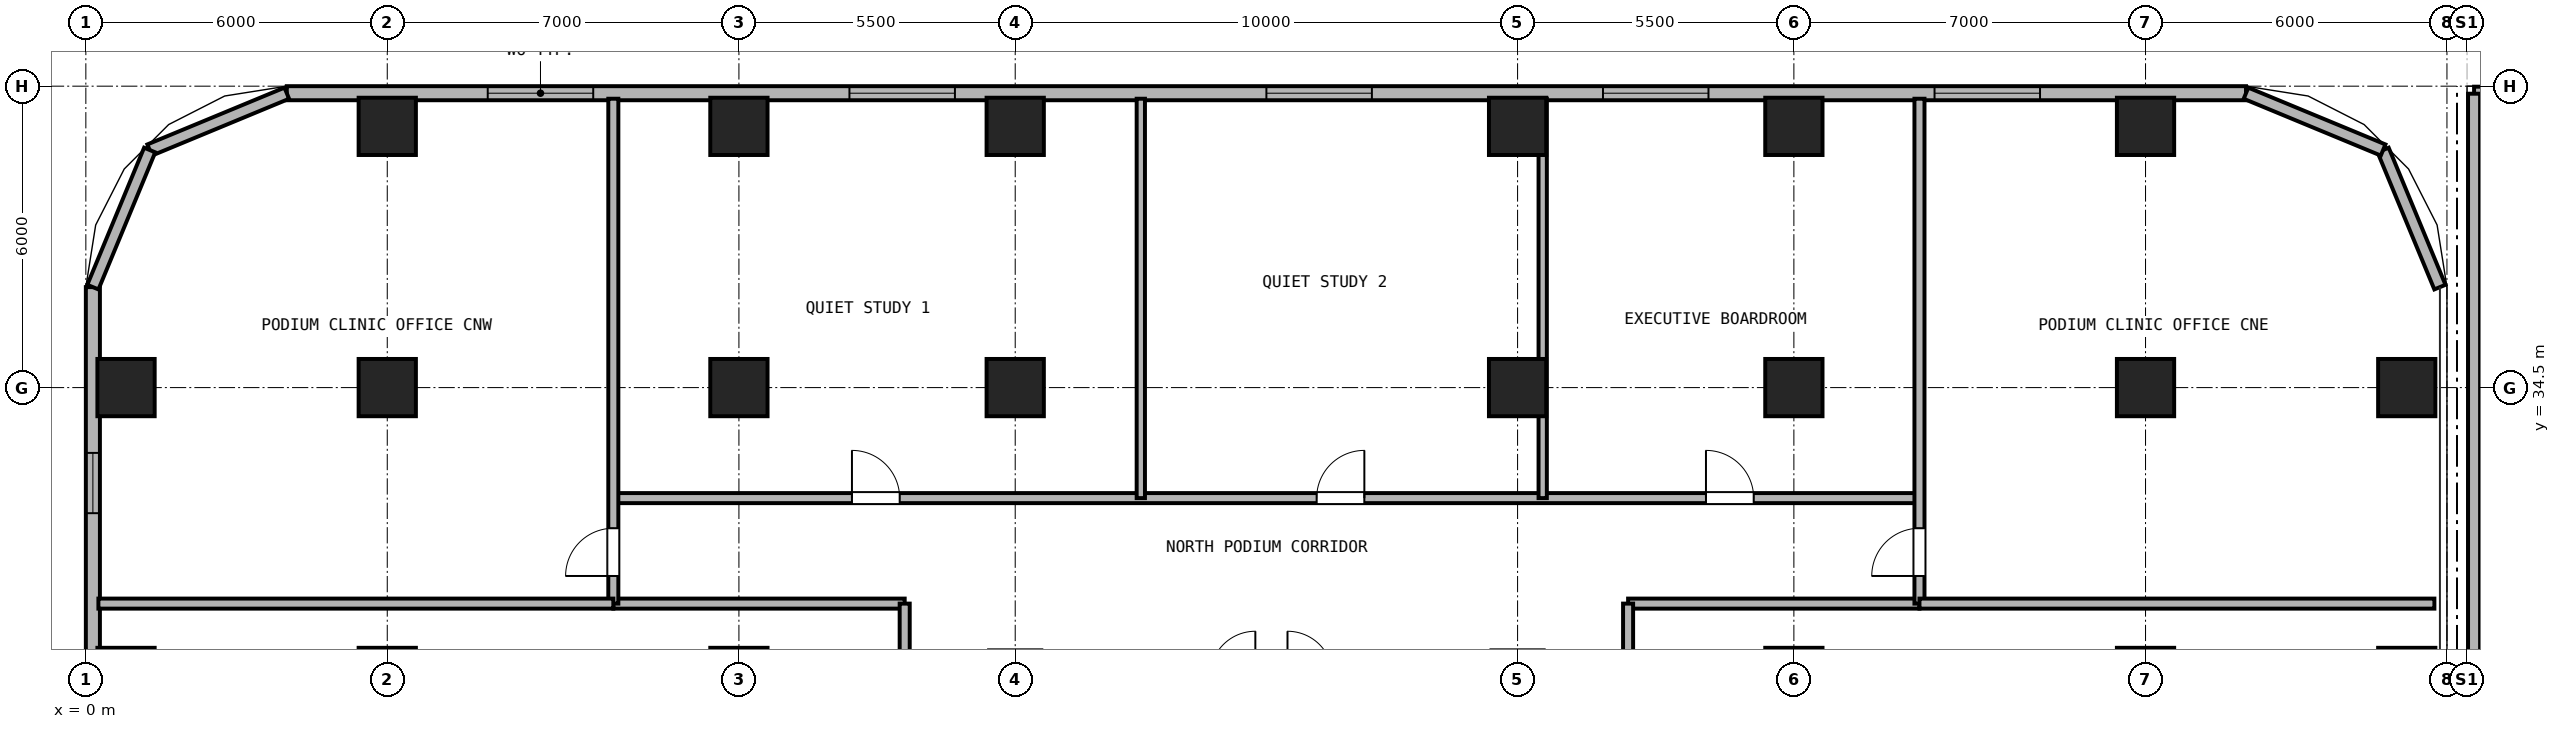
"""IFC4 building model, lengths in metres.
Left out: names, types, materials, properties, quantities, classifications, styles, units other than length and angle.
Written with IfcOpenShell. Run it as: python <this file> out.ifc"""

import sys

from ifc_helpers import new_model, si_unit, direction, frame, frame_2d, origin, origin_2d, place, context, subcontext, project, spatial, rectangle, hollow_rectangle, extrude, source, transform, mapped, element, fill, save


model = new_model("IFC4")
c1 = context("Model", 3, precision=1e-05, world=origin(), true_north=direction((0.0, 1.0)))
c2 = subcontext(c1, "Body", "Model", "MODEL_VIEW")
j1 = project(units=[si_unit("LENGTHUNIT", "METRE"), si_unit("PLANEANGLEUNIT", "RADIAN")], contexts=[c1])
p1 = place(None, origin())
s1 = spatial("IfcSite", under=j1, at=p1, CompositionType="ELEMENT")
p2 = place(p1, origin())
s2 = spatial("IfcBuilding", under=s1, at=p2, CompositionType="ELEMENT")
p3 = place(p2, frame((0.0, 0.0, 18.0)))
s3 = spatial("IfcBuildingStorey", under=s2, at=p3, CompositionType="ELEMENT", Elevation=18.0)
m1 = source(origin(), c2, "Body", "SweptSolid", [
    extrude(hollow_rectangle(XDim=1.14, YDim=1.14, WallThickness=0.07, at=origin_2d()), origin(), (0.0, 0.0, 1.0), 4.14),
])
for number, where, z_axis, x_axis in (
    (1, (6.0, 39.7, 0.0), (0.0, 0.0, 1.0), (1.0, 0.0, 0.0)),
    (2, (13.0, 39.7, 0.0), (0.0, 0.0, 1.0), (1.0, 0.0, 0.0)),
    (3, (18.5, 39.7, 0.0), (0.0, 0.0, 1.0), (1.0, 0.0, 0.0)),
    (4, (28.5, 39.7, 0.0), (0.0, 0.0, 1.0), (1.0, 0.0, 0.0)),
    (5, (34.0, 39.7, 0.0), (0.0, 0.0, 1.0), (1.0, 0.0, 0.0)),
    (6, (41.0, 39.7, 0.0), (0.0, 0.0, 1.0), (1.0, 0.0, 0.0)),
    (7, (0.8, 28.75, 0.0), (0.0, 0.0, 1.0), (1.0, 0.0, 0.0)),
    (8, (46.2, 28.75, 0.0), (0.0, 0.0, 1.0), (1.0, 0.0, 0.0)),
    (9, (0.8, 34.5, 0.0), (0.0, 0.0, 1.0), (1.0, 0.0, 0.0)),
    (10, (46.2, 34.5, 0.0), (0.0, 0.0, 1.0), (1.0, 0.0, 0.0)),
    (11, (6.0, 28.75, 0.0), (0.0, 0.0, 1.0), (1.0, 0.0, 0.0)),
    (12, (6.0, 34.5, 0.0), (0.0, 0.0, 1.0), (1.0, 0.0, 0.0)),
    (13, (13.0, 28.75, 0.0), (0.0, 0.0, 1.0), (1.0, 0.0, 0.0)),
    (14, (13.0, 34.5, 0.0), (0.0, 0.0, 1.0), (1.0, 0.0, 0.0)),
    (15, (18.5, 34.5, 0.0), (0.0, 0.0, 1.0), (1.0, 0.0, 0.0)),
    (16, (28.5, 34.5, 0.0), (0.0, 0.0, 1.0), (1.0, 0.0, 0.0)),
    (17, (34.0, 28.75, 0.0), (0.0, 0.0, 1.0), (1.0, 0.0, 0.0)),
    (18, (34.0, 34.5, 0.0), (0.0, 0.0, 1.0), (1.0, 0.0, 0.0)),
    (19, (41.0, 28.75, 0.0), (0.0, 0.0, 1.0), (1.0, 0.0, 0.0)),
    (20, (41.0, 34.5, 0.0), (0.0, 0.0, 1.0), (1.0, 0.0, 0.0)),
):
    element("IfcColumn", number, at=place(p3, frame(where, z_axis=z_axis, x_axis=x_axis)), inside=s3, PredefinedType="COLUMN", context=c2, shape_type="MappedRepresentation", body=[
        mapped(m1, transform((0.0, 0.0, 0.0), x_axis=(1.0, 0.0, 0.0), y_axis=(0.0, 1.0, 0.0), z_axis=(0.0, 0.0, 1.0), scale=1.0)),
    ])
p4 = place(p3, frame((0.14, 4.0, 0.0), z_axis=(0.0, 0.0, 1.0), x_axis=(0.0, 1.0, 0.0)))
e21 = element("IfcWall", 21, at=p4, inside=s3, PredefinedType="SOLIDWALL", context=c2, shape_type="SweptSolid", body=[
    extrude(rectangle(XDim=32.5, YDim=0.28, at=frame_2d((16.25, 0.0))), origin(), (0.0, 0.0, 1.0), 4.14),
])
p5 = place(p4, frame((3.6, 0.0, 0.9)))
e22 = element("IfcOpeningElement", 22, at=p5, cuts=e21, PredefinedType="OPENING", context=c2, shape_type="SweptSolid", body=[
    extrude(rectangle(XDim=1.2, YDim=1.65, at=frame_2d((0.6, 0.825))), frame((0.0, 0.15, 0.0), z_axis=(0.0, -1.0, 0.0), x_axis=(1.0, 0.0, 0.0)), (0.0, 0.0, 1.0), 0.3),
])
p6 = place(p4, frame((9.8, 0.0, 0.9)))
e23 = element("IfcOpeningElement", 23, at=p6, cuts=e21, PredefinedType="OPENING", context=c2, shape_type="SweptSolid", body=[
    extrude(rectangle(XDim=1.2, YDim=1.65, at=frame_2d((0.6, 0.825))), frame((0.0, 0.15, 0.0), z_axis=(0.0, -1.0, 0.0), x_axis=(1.0, 0.0, 0.0)), (0.0, 0.0, 1.0), 0.3),
])
p7 = place(p4, frame((15.8, 0.0, 0.9)))
e24 = element("IfcOpeningElement", 24, at=p7, cuts=e21, PredefinedType="OPENING", context=c2, shape_type="SweptSolid", body=[
    extrude(rectangle(XDim=1.2, YDim=1.65, at=frame_2d((0.6, 0.825))), frame((0.0, 0.15, 0.0), z_axis=(0.0, -1.0, 0.0), x_axis=(1.0, 0.0, 0.0)), (0.0, 0.0, 1.0), 0.3),
])
p8 = place(p4, frame((22.4, 0.0, 0.9)))
e25 = element("IfcOpeningElement", 25, at=p8, cuts=e21, PredefinedType="OPENING", context=c2, shape_type="SweptSolid", body=[
    extrude(rectangle(XDim=1.2, YDim=1.65, at=frame_2d((0.6, 0.825))), frame((0.0, 0.15, 0.0), z_axis=(0.0, -1.0, 0.0), x_axis=(1.0, 0.0, 0.0)), (0.0, 0.0, 1.0), 0.3),
])
p9 = place(p4, frame((28.0, 0.0, 0.9)))
e26 = element("IfcOpeningElement", 26, at=p9, cuts=e21, PredefinedType="OPENING", context=c2, shape_type="SweptSolid", body=[
    extrude(rectangle(XDim=1.2, YDim=1.65, at=frame_2d((0.6, 0.825))), frame((0.0, 0.15, 0.0), z_axis=(0.0, -1.0, 0.0), x_axis=(1.0, 0.0, 0.0)), (0.0, 0.0, 1.0), 0.3),
])
p10 = place(p3, frame((4.0, 40.36, 0.0), z_axis=(0.0, 0.0, 1.0), x_axis=(1.0, 0.0, 0.0)))
e27 = element("IfcWall", 27, at=p10, inside=s3, PredefinedType="SOLIDWALL", context=c2, shape_type="SweptSolid", body=[
    extrude(rectangle(XDim=39.0, YDim=0.28, at=frame_2d((19.5, 0.0))), origin(), (0.0, 0.0, 1.0), 4.14),
])
p11 = place(p10, frame((4.0, 0.0, 0.9)))
e28 = element("IfcOpeningElement", 28, at=p11, cuts=e27, PredefinedType="OPENING", context=c2, shape_type="SweptSolid", body=[
    extrude(rectangle(XDim=2.1, YDim=1.5, at=frame_2d((1.05, 0.75))), frame((0.0, 0.15, 0.0), z_axis=(0.0, -1.0, 0.0), x_axis=(1.0, 0.0, 0.0)), (0.0, 0.0, 1.0), 0.3),
])
p12 = place(p10, frame((11.2, 0.0, 0.9)))
e29 = element("IfcOpeningElement", 29, at=p12, cuts=e27, PredefinedType="OPENING", context=c2, shape_type="SweptSolid", body=[
    extrude(rectangle(XDim=2.1, YDim=1.5, at=frame_2d((1.05, 0.75))), frame((0.0, 0.15, 0.0), z_axis=(0.0, -1.0, 0.0), x_axis=(1.0, 0.0, 0.0)), (0.0, 0.0, 1.0), 0.3),
])
p13 = place(p10, frame((19.5, 0.0, 0.9)))
e30 = element("IfcOpeningElement", 30, at=p13, cuts=e27, PredefinedType="OPENING", context=c2, shape_type="SweptSolid", body=[
    extrude(rectangle(XDim=2.1, YDim=1.5, at=frame_2d((1.05, 0.75))), frame((0.0, 0.15, 0.0), z_axis=(0.0, -1.0, 0.0), x_axis=(1.0, 0.0, 0.0)), (0.0, 0.0, 1.0), 0.3),
])
p14 = place(p10, frame((26.2, 0.0, 0.9)))
e31 = element("IfcOpeningElement", 31, at=p14, cuts=e27, PredefinedType="OPENING", context=c2, shape_type="SweptSolid", body=[
    extrude(rectangle(XDim=2.1, YDim=1.5, at=frame_2d((1.05, 0.75))), frame((0.0, 0.15, 0.0), z_axis=(0.0, -1.0, 0.0), x_axis=(1.0, 0.0, 0.0)), (0.0, 0.0, 1.0), 0.3),
])
p15 = place(p10, frame((32.8, 0.0, 0.9)))
e32 = element("IfcOpeningElement", 32, at=p15, cuts=e27, PredefinedType="OPENING", context=c2, shape_type="SweptSolid", body=[
    extrude(rectangle(XDim=2.1, YDim=1.5, at=frame_2d((1.05, 0.75))), frame((0.0, 0.15, 0.0), z_axis=(0.0, -1.0, 0.0), x_axis=(1.0, 0.0, 0.0)), (0.0, 0.0, 1.0), 0.3),
])
for number, where, z_axis, x_axis in (
    (33, (46.86, 36.5, 0.0), (0.0, 0.0, 1.0), (-0.383, 0.924, 0.0)),
    (34, (45.729, 39.229, 0.0), (0.0, 0.0, 1.0), (-0.924, 0.383, 0.0)),
    (35, (4.0, 40.36, 0.0), (0.0, 0.0, 1.0), (-0.924, -0.383, 0.0)),
    (36, (1.271, 39.229, 0.0), (0.0, 0.0, 1.0), (-0.383, -0.924, 0.0)),
):
    element("IfcWall", number, at=place(p3, frame(where, z_axis=z_axis, x_axis=x_axis)), inside=s3, PredefinedType="SOLIDWALL", context=c2, shape_type="SweptSolid", body=[
        extrude(rectangle(XDim=2.954, YDim=0.24, at=frame_2d((1.477, 0.0))), origin(), (0.0, 0.0, 1.0), 4.14),
    ])
p16 = place(p3, frame((47.54, 40.35, 0.0), z_axis=(0.0, 0.0, 1.0), x_axis=(1.0, 0.0, 0.0)))
e37 = element("IfcWall", 37, at=p16, inside=s3, PredefinedType="SOLIDWALL", context=c2, shape_type="SweptSolid", body=[
    extrude(rectangle(XDim=23.91, YDim=0.28, at=frame_2d((11.955, 0.0))), origin(), (0.0, 0.0, 1.0), 4.2),
])
p17 = place(p16, frame((6.01, 0.0, 1.1)))
e38 = element("IfcOpeningElement", 38, at=p17, cuts=e37, PredefinedType="OPENING", context=c2, shape_type="SweptSolid", body=[
    extrude(rectangle(XDim=0.9, YDim=1.5, at=frame_2d((0.45, 0.75))), frame((0.0, 0.15, 0.0), z_axis=(0.0, -1.0, 0.0), x_axis=(1.0, 0.0, 0.0)), (0.0, 0.0, 1.0), 0.3),
])
p18 = place(p3, frame((47.54, -0.54, 0.0), z_axis=(0.0, 0.0, 1.0), x_axis=(0.0, 1.0, 0.0)))
e39 = element("IfcWall", 39, at=p18, inside=s3, PredefinedType="SOLIDWALL", context=c2, shape_type="SweptSolid", body=[
    extrude(rectangle(XDim=40.89, YDim=0.24, at=frame_2d((20.445, 0.0))), origin(), (0.0, 0.0, 1.0), 4.2),
])
p19 = place(p3, frame((10.5, 32.3, 0.0), z_axis=(0.0, 0.0, 1.0), x_axis=(1.0, 0.0, 0.0)))
e40 = element("IfcWall", 40, at=p19, inside=s3, PredefinedType="PARTITIONING", context=c2, shape_type="SweptSolid", body=[
    extrude(rectangle(XDim=26.0, YDim=0.2, at=frame_2d((13.0, 0.0))), origin(), (0.0, 0.0, 1.0), 4.14),
])
p20 = place(p19, frame((4.75, 0.0, 0.0)))
e41 = element("IfcOpeningElement", 41, at=p20, cuts=e40, PredefinedType="OPENING", context=c2, shape_type="SweptSolid", body=[
    extrude(rectangle(XDim=0.95, YDim=2.15, at=frame_2d((0.475, 1.075))), frame((0.0, 0.11, 0.0), z_axis=(0.0, -1.0, 0.0), x_axis=(1.0, 0.0, 0.0)), (0.0, 0.0, 1.0), 0.22),
])
p21 = place(p19, frame((14.0, 0.0, 0.0)))
e42 = element("IfcOpeningElement", 42, at=p21, cuts=e40, PredefinedType="OPENING", context=c2, shape_type="SweptSolid", body=[
    extrude(rectangle(XDim=0.95, YDim=2.15, at=frame_2d((0.475, 1.075))), frame((0.0, 0.11, 0.0), z_axis=(0.0, -1.0, 0.0), x_axis=(1.0, 0.0, 0.0)), (0.0, 0.0, 1.0), 0.22),
])
p22 = place(p19, frame((21.75, 0.0, 0.0)))
e43 = element("IfcOpeningElement", 43, at=p22, cuts=e40, PredefinedType="OPENING", context=c2, shape_type="SweptSolid", body=[
    extrude(rectangle(XDim=0.95, YDim=2.15, at=frame_2d((0.475, 1.075))), frame((0.0, 0.11, 0.0), z_axis=(0.0, -1.0, 0.0), x_axis=(1.0, 0.0, 0.0)), (0.0, 0.0, 1.0), 0.22),
])
for number, where, z_axis, x_axis in (
    (44, (10.5, 30.2, 0.0), (0.0, 0.0, 1.0), (1.0, 0.0, 0.0)),
    (45, (30.7, 30.2, 0.0), (0.0, 0.0, 1.0), (1.0, 0.0, 0.0)),
):
    element("IfcWall", number, at=place(p3, frame(where, z_axis=z_axis, x_axis=x_axis)), inside=s3, PredefinedType="PARTITIONING", context=c2, shape_type="SweptSolid", body=[
        extrude(rectangle(XDim=5.8, YDim=0.2, at=frame_2d((2.9, 0.0))), origin(), (0.0, 0.0, 1.0), 4.14),
    ])
p23 = place(p3, frame((16.3, 9.5, 0.0), z_axis=(0.0, 0.0, 1.0), x_axis=(0.0, 1.0, 0.0)))
e46 = element("IfcWall", 46, at=p23, inside=s3, PredefinedType="PARTITIONING", context=c2, shape_type="SweptSolid", body=[
    extrude(rectangle(XDim=20.7, YDim=0.2, at=frame_2d((10.35, 0.0))), origin(), (0.0, 0.0, 1.0), 4.14),
])
p24 = place(p23, frame((5.0, 0.0, 0.0)))
e47 = element("IfcOpeningElement", 47, at=p24, cuts=e46, PredefinedType="OPENING", context=c2, shape_type="SweptSolid", body=[
    extrude(rectangle(XDim=0.95, YDim=2.15, at=frame_2d((0.475, 1.075))), frame((0.0, 0.11, 0.0), z_axis=(0.0, -1.0, 0.0), x_axis=(1.0, 0.0, 0.0)), (0.0, 0.0, 1.0), 0.22),
])
p25 = place(p23, frame((15.35, 0.0, 0.0)))
e48 = element("IfcOpeningElement", 48, at=p25, cuts=e46, PredefinedType="OPENING", context=c2, shape_type="SweptSolid", body=[
    extrude(rectangle(XDim=0.95, YDim=2.15, at=frame_2d((0.475, 1.075))), frame((0.0, 0.11, 0.0), z_axis=(0.0, -1.0, 0.0), x_axis=(1.0, 0.0, 0.0)), (0.0, 0.0, 1.0), 0.22),
])
p26 = place(p3, frame((30.7, 9.5, 0.0), z_axis=(0.0, 0.0, 1.0), x_axis=(0.0, 1.0, 0.0)))
e49 = element("IfcWall", 49, at=p26, inside=s3, PredefinedType="PARTITIONING", context=c2, shape_type="SweptSolid", body=[
    extrude(rectangle(XDim=20.7, YDim=0.2, at=frame_2d((10.35, 0.0))), origin(), (0.0, 0.0, 1.0), 4.14),
])
p27 = place(p26, frame((9.85, 0.0, 0.0)))
e50 = element("IfcOpeningElement", 50, at=p27, cuts=e49, PredefinedType="OPENING", context=c2, shape_type="SweptSolid", body=[
    extrude(rectangle(XDim=0.95, YDim=2.15, at=frame_2d((0.475, 1.075))), frame((0.0, 0.11, 0.0), z_axis=(0.0, -1.0, 0.0), x_axis=(1.0, 0.0, 0.0)), (0.0, 0.0, 1.0), 0.22),
])
p28 = place(p3, frame((10.5, 30.2, 0.0), z_axis=(0.0, 0.0, 1.0), x_axis=(0.0, 1.0, 0.0)))
e51 = element("IfcWall", 51, at=p28, inside=s3, PredefinedType="PARTITIONING", context=c2, shape_type="SweptSolid", body=[
    extrude(rectangle(XDim=10.05, YDim=0.2, at=frame_2d((5.025, 0.0))), origin(), (0.0, 0.0, 1.0), 4.14),
])
p29 = place(p28, frame((0.55, 0.0, 0.0)))
e52 = element("IfcOpeningElement", 52, at=p29, cuts=e51, PredefinedType="OPENING", context=c2, shape_type="SweptSolid", body=[
    extrude(rectangle(XDim=0.95, YDim=2.15, at=frame_2d((0.475, 1.075))), frame((0.0, 0.11, 0.0), z_axis=(0.0, -1.0, 0.0), x_axis=(1.0, 0.0, 0.0)), (0.0, 0.0, 1.0), 0.22),
])
p30 = place(p3, frame((36.5, 30.2, 0.0), z_axis=(0.0, 0.0, 1.0), x_axis=(0.0, 1.0, 0.0)))
e53 = element("IfcWall", 53, at=p30, inside=s3, PredefinedType="PARTITIONING", context=c2, shape_type="SweptSolid", body=[
    extrude(rectangle(XDim=10.05, YDim=0.2, at=frame_2d((5.025, 0.0))), origin(), (0.0, 0.0, 1.0), 4.14),
])
p31 = place(p30, frame((0.55, 0.0, 0.0)))
e54 = element("IfcOpeningElement", 54, at=p31, cuts=e53, PredefinedType="OPENING", context=c2, shape_type="SweptSolid", body=[
    extrude(rectangle(XDim=0.95, YDim=2.15, at=frame_2d((0.475, 1.075))), frame((0.0, 0.11, 0.0), z_axis=(0.0, -1.0, 0.0), x_axis=(1.0, 0.0, 0.0)), (0.0, 0.0, 1.0), 0.22),
])
for number, where, z_axis, x_axis in (
    (55, (0.25, 30.2, 0.0), (0.0, 0.0, 1.0), (1.0, 0.0, 0.0)),
    (56, (36.5, 30.2, 0.0), (0.0, 0.0, 1.0), (1.0, 0.0, 0.0)),
):
    element("IfcWall", number, at=place(p3, frame(where, z_axis=z_axis, x_axis=x_axis)), inside=s3, PredefinedType="PARTITIONING", context=c2, shape_type="SweptSolid", body=[
        extrude(rectangle(XDim=10.25, YDim=0.2, at=frame_2d((5.125, 0.0))), origin(), (0.0, 0.0, 1.0), 4.14),
    ])
for number, where, z_axis, x_axis in (
    (57, (21.0, 32.3, 0.0), (0.0, 0.0, 1.0), (0.0, 1.0, 0.0)),
    (58, (29.0, 32.3, 0.0), (0.0, 0.0, 1.0), (0.0, 1.0, 0.0)),
):
    element("IfcWall", number, at=place(p3, frame(where, z_axis=z_axis, x_axis=x_axis)), inside=s3, PredefinedType="PARTITIONING", context=c2, shape_type="SweptSolid", body=[
        extrude(rectangle(XDim=7.95, YDim=0.165, at=frame_2d((3.975, 0.0))), origin(), (0.0, 0.0, 1.0), 4.14),
    ])
p32 = place(p9, origin())
e59 = element("IfcWindow", 59, at=p32, inside=s3, PartitioningType="SINGLE_PANEL", PredefinedType="WINDOW", context=c2, shape_type="SweptSolid", body=[
    extrude(rectangle(XDim=1.2, YDim=1.65, at=frame_2d((0.6, 0.825))), frame((0.0, 0.03, 0.0), z_axis=(0.0, -1.0, 0.0), x_axis=(1.0, 0.0, 0.0)), (0.0, 0.0, 1.0), 0.06),
])
fill(e26, e59)
p33 = place(p11, origin())
e60 = element("IfcWindow", 60, at=p33, inside=s3, PartitioningType="SINGLE_PANEL", PredefinedType="WINDOW", context=c2, shape_type="SweptSolid", body=[
    extrude(rectangle(XDim=2.1, YDim=1.5, at=frame_2d((1.05, 0.75))), frame((0.0, 0.03, 0.0), z_axis=(0.0, -1.0, 0.0), x_axis=(1.0, 0.0, 0.0)), (0.0, 0.0, 1.0), 0.06),
])
fill(e28, e60)
p34 = place(p12, origin())
e61 = element("IfcWindow", 61, at=p34, inside=s3, PartitioningType="SINGLE_PANEL", PredefinedType="WINDOW", context=c2, shape_type="SweptSolid", body=[
    extrude(rectangle(XDim=2.1, YDim=1.5, at=frame_2d((1.05, 0.75))), frame((0.0, 0.03, 0.0), z_axis=(0.0, -1.0, 0.0), x_axis=(1.0, 0.0, 0.0)), (0.0, 0.0, 1.0), 0.06),
])
fill(e29, e61)
p35 = place(p13, origin())
e62 = element("IfcWindow", 62, at=p35, inside=s3, PartitioningType="SINGLE_PANEL", PredefinedType="WINDOW", context=c2, shape_type="SweptSolid", body=[
    extrude(rectangle(XDim=2.1, YDim=1.5, at=frame_2d((1.05, 0.75))), frame((0.0, 0.03, 0.0), z_axis=(0.0, -1.0, 0.0), x_axis=(1.0, 0.0, 0.0)), (0.0, 0.0, 1.0), 0.06),
])
fill(e30, e62)
p36 = place(p14, origin())
e63 = element("IfcWindow", 63, at=p36, inside=s3, PartitioningType="SINGLE_PANEL", PredefinedType="WINDOW", context=c2, shape_type="SweptSolid", body=[
    extrude(rectangle(XDim=2.1, YDim=1.5, at=frame_2d((1.05, 0.75))), frame((0.0, 0.03, 0.0), z_axis=(0.0, -1.0, 0.0), x_axis=(1.0, 0.0, 0.0)), (0.0, 0.0, 1.0), 0.06),
])
fill(e31, e63)
p37 = place(p15, origin())
e64 = element("IfcWindow", 64, at=p37, inside=s3, PartitioningType="SINGLE_PANEL", PredefinedType="WINDOW", context=c2, shape_type="SweptSolid", body=[
    extrude(rectangle(XDim=2.1, YDim=1.5, at=frame_2d((1.05, 0.75))), frame((0.0, 0.03, 0.0), z_axis=(0.0, -1.0, 0.0), x_axis=(1.0, 0.0, 0.0)), (0.0, 0.0, 1.0), 0.06),
])
fill(e32, e64)
p38 = place(p20, origin())
e65 = element("IfcDoor", 65, at=p38, inside=s3, OperationType="SINGLE_SWING_LEFT", PredefinedType="DOOR", context=c2, shape_type="SweptSolid", body=[
    extrude(rectangle(XDim=0.95, YDim=2.15, at=frame_2d((0.475, 1.075))), frame((0.0, 0.025, 0.0), z_axis=(0.0, -1.0, 0.0), x_axis=(1.0, 0.0, 0.0)), (0.0, 0.0, 1.0), 0.05),
])
fill(e41, e65)
p39 = place(p21, origin())
e66 = element("IfcDoor", 66, at=p39, inside=s3, OperationType="SINGLE_SWING_RIGHT", PredefinedType="DOOR", context=c2, shape_type="SweptSolid", body=[
    extrude(rectangle(XDim=0.95, YDim=2.15, at=frame_2d((0.475, 1.075))), frame((0.0, 0.025, 0.0), z_axis=(0.0, -1.0, 0.0), x_axis=(1.0, 0.0, 0.0)), (0.0, 0.0, 1.0), 0.05),
])
fill(e42, e66)
p40 = place(p22, origin())
e67 = element("IfcDoor", 67, at=p40, inside=s3, OperationType="SINGLE_SWING_LEFT", PredefinedType="DOOR", context=c2, shape_type="SweptSolid", body=[
    extrude(rectangle(XDim=0.95, YDim=2.15, at=frame_2d((0.475, 1.075))), frame((0.0, 0.025, 0.0), z_axis=(0.0, -1.0, 0.0), x_axis=(1.0, 0.0, 0.0)), (0.0, 0.0, 1.0), 0.05),
])
fill(e43, e67)
p41 = place(p29, frame((0.95, 0.0, 0.0), z_axis=(0.0, 0.0, 1.0), x_axis=(-1.0, 0.0, 0.0)))
e68 = element("IfcDoor", 68, at=p41, inside=s3, OperationType="SINGLE_SWING_LEFT", PredefinedType="DOOR", context=c2, shape_type="SweptSolid", body=[
    extrude(rectangle(XDim=0.95, YDim=2.15, at=frame_2d((0.475, 1.075))), frame((0.0, 0.025, 0.0), z_axis=(0.0, -1.0, 0.0), x_axis=(1.0, 0.0, 0.0)), (0.0, 0.0, 1.0), 0.05),
])
fill(e52, e68)
p42 = place(p31, origin())
e69 = element("IfcDoor", 69, at=p42, inside=s3, OperationType="SINGLE_SWING_LEFT", PredefinedType="DOOR", context=c2, shape_type="SweptSolid", body=[
    extrude(rectangle(XDim=0.95, YDim=2.15, at=frame_2d((0.475, 1.075))), frame((0.0, 0.025, 0.0), z_axis=(0.0, -1.0, 0.0), x_axis=(1.0, 0.0, 0.0)), (0.0, 0.0, 1.0), 0.05),
])
fill(e54, e69)
save(model, sys.argv[1])
